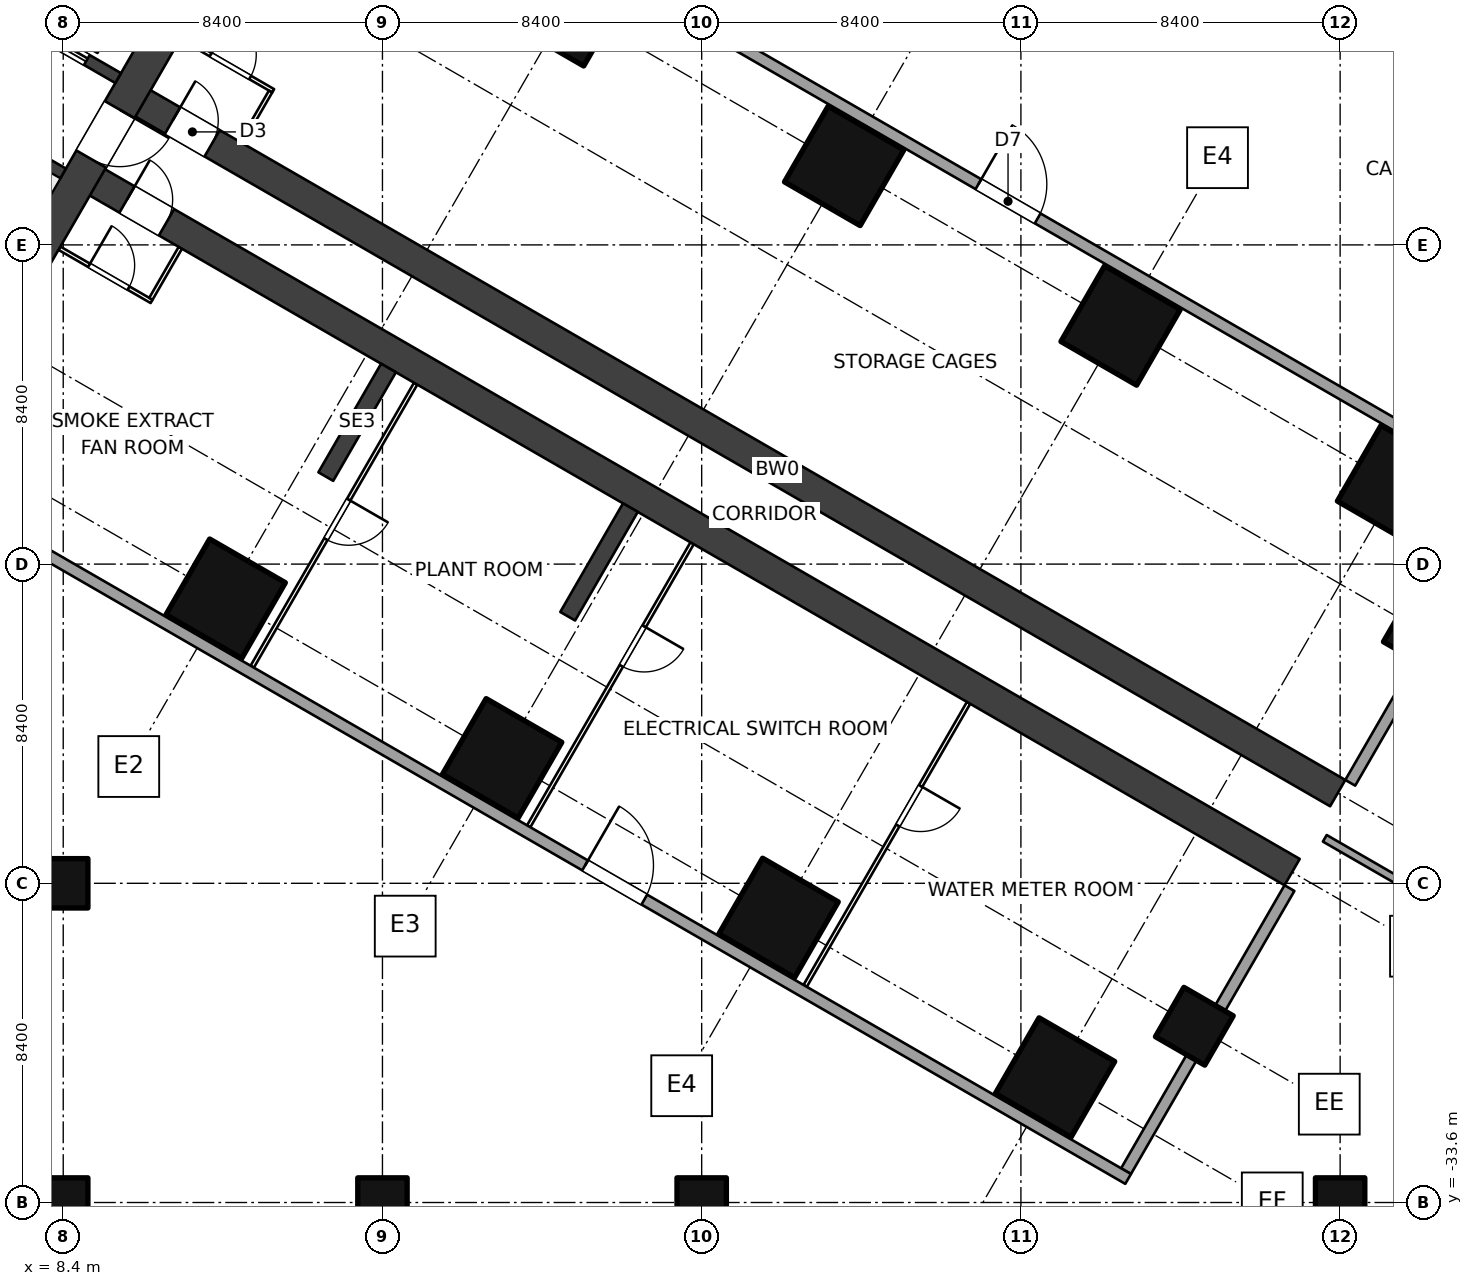
"""IFC4 building model, lengths in metres.
Left out: names, types, materials, properties, quantities, classifications, styles, units other than length and angle.
Written with IfcOpenShell. Run it as: python <this file> out.ifc"""

import sys

from ifc_helpers import new_model, si_unit, direction, frame, frame_2d, origin, origin_2d, place, context, subcontext, project, spatial, rectangle, extrude, element, fill, save


model = new_model("IFC4")
c1 = context("Model", 3, precision=1e-05, world=origin(), true_north=direction((0.0, 1.0)))
c2 = subcontext(c1, "Body", "Model", "MODEL_VIEW")
j1 = project(units=[si_unit("LENGTHUNIT", "METRE"), si_unit("PLANEANGLEUNIT", "RADIAN")], contexts=[c1])
p1 = place(None, origin())
s1 = spatial("IfcSite", under=j1, at=p1, CompositionType="ELEMENT")
p2 = place(p1, origin())
s2 = spatial("IfcBuilding", under=s1, at=p2, CompositionType="ELEMENT")
p3 = place(p2, frame((0.0, 0.0, -3.5)))
s3 = spatial("IfcBuildingStorey", under=s2, at=p3, CompositionType="ELEMENT", Elevation=-3.5)
for number, where, z_axis, x_axis in (
    (1, (21.675, -2.122, 0.0), (0.0, 0.0, 1.0), (-0.5, -0.866, 0.0)),
    (2, (12.675, -17.71, 0.0), (0.0, 0.0, 1.0), (-0.5, -0.866, 0.0)),
    (3, (28.949, -6.322, 0.0), (0.0, 0.0, 1.0), (-0.5, -0.866, 0.0)),
    (4, (19.949, -21.91, 0.0), (0.0, 0.0, 1.0), (-0.5, -0.866, 0.0)),
    (5, (36.224, -10.521, 0.0), (0.0, 0.0, 1.0), (-0.5, -0.866, 0.0)),
    (6, (27.224, -26.11, 0.0), (0.0, 0.0, 1.0), (-0.5, -0.866, 0.0)),
    (7, (43.499, -14.721, 0.0), (0.0, 0.0, 1.0), (-0.5, -0.866, 0.0)),
    (8, (34.499, -30.31, 0.0), (0.0, 0.0, 1.0), (-0.5, -0.866, 0.0)),
):
    element("IfcColumn", number, at=place(p3, frame(where, z_axis=z_axis, x_axis=x_axis)), inside=s3, PredefinedType="COLUMN", context=c2, shape_type="SweptSolid", body=[
        extrude(rectangle(XDim=2.3, YDim=2.3, at=origin_2d()), origin(), (0.0, 0.0, 1.0), 3.5),
    ])
for number, where, z_axis, x_axis in (
    (9, (44.164, -18.57, 0.0), (0.0, 0.0, 1.0), (-0.5, -0.866, 0.0)),
    (10, (38.164, -28.962, 0.0), (0.0, 0.0, 1.0), (-0.5, -0.866, 0.0)),
):
    element("IfcColumn", number, at=place(p3, frame(where, z_axis=z_axis, x_axis=x_axis)), inside=s3, PredefinedType="COLUMN", context=c2, shape_type="SweptSolid", body=[
        extrude(rectangle(XDim=1.5, YDim=1.5, at=origin_2d()), origin(), (0.0, 0.0, 1.0), 3.5),
    ])
for number, where, z_axis, x_axis in (
    (11, (8.4, -33.6, 0.0), (0.0, 0.0, 1.0), (1.0, 0.0, 0.0)),
    (12, (8.4, -25.2, 0.0), (0.0, 0.0, 1.0), (1.0, 0.0, 0.0)),
    (13, (16.8, -33.6, 0.0), (0.0, 0.0, 1.0), (1.0, 0.0, 0.0)),
    (14, (25.2, -33.6, 0.0), (0.0, 0.0, 1.0), (1.0, 0.0, 0.0)),
    (15, (42.0, -33.6, 0.0), (0.0, 0.0, 1.0), (1.0, 0.0, 0.0)),
):
    element("IfcColumn", number, at=place(p3, frame(where, z_axis=z_axis, x_axis=x_axis)), inside=s3, PredefinedType="COLUMN", context=c2, shape_type="SweptSolid", body=[
        extrude(rectangle(XDim=1.3, YDim=1.3, at=origin_2d()), origin(), (0.0, 0.0, 1.0), 3.5),
    ])
p4 = place(p3, frame((12.551, -0.225, 0.0), z_axis=(0.0, 0.0, 1.0), x_axis=(-0.499997612506, -0.8660267822, 0.0)))
e16 = element("IfcWall", 16, at=p4, inside=s3, PredefinedType="SHEAR", context=c2, shape_type="SweptSolid", body=[
    extrude(rectangle(XDim=12.161, YDim=0.9, at=frame_2d((6.08, 0.0))), origin(), (0.0, 0.0, 1.0), 3.5),
])
p5 = place(p4, frame((5.33, 0.0, 0.0)))
e17 = element("IfcOpeningElement", 17, at=p5, cuts=e16, PredefinedType="OPENING", context=c2, shape_type="SweptSolid", body=[
    extrude(rectangle(XDim=1.5, YDim=2.1, at=frame_2d((0.75, 1.05))), frame((0.0, 0.46, 0.0), z_axis=(0.0, -1.0, 0.0), x_axis=(1.0, 0.0, 0.0)), (0.0, 0.0, 1.0), 0.92),
])
p6 = place(p3, frame((2.419, -3.071, 0.0), z_axis=(0.0, 0.0, 1.0), x_axis=(0.86602711848, -0.499997030048, 0.0)))
e18 = element("IfcWall", 18, at=p6, inside=s3, PredefinedType="SHEAR", context=c2, shape_type="SweptSolid", body=[
    extrude(rectangle(XDim=6.901, YDim=0.3, at=frame_2d((3.451, 0.0))), origin(), (0.0, 0.0, 1.0), 3.5),
])
p7 = place(p6, frame((0.25, 0.0, 0.0)))
e19 = element("IfcOpeningElement", 19, at=p7, cuts=e18, PredefinedType="OPENING", context=c2, shape_type="SweptSolid", body=[
    extrude(rectangle(XDim=1.0, YDim=2.1, at=frame_2d((0.5, 1.05))), frame((0.0, 0.16, 0.0), z_axis=(0.0, -1.0, 0.0), x_axis=(1.0, 0.0, 0.0)), (0.0, 0.0, 1.0), 0.32),
])
p8 = place(p3, frame((3.869, -0.559, 0.0), z_axis=(0.0, 0.0, 1.0), x_axis=(0.86602711848, -0.499997030048, 0.0)))
e20 = element("IfcWall", 20, at=p8, inside=s3, PredefinedType="SHEAR", context=c2, shape_type="SweptSolid", body=[
    extrude(rectangle(XDim=6.901, YDim=0.3, at=frame_2d((3.451, 0.0))), origin(), (0.0, 0.0, 1.0), 3.5),
])
p9 = place(p8, frame((4.85, 0.0, 0.0)))
e21 = element("IfcOpeningElement", 21, at=p9, cuts=e20, PredefinedType="OPENING", context=c2, shape_type="SweptSolid", body=[
    extrude(rectangle(XDim=1.1, YDim=2.1, at=frame_2d((0.55, 1.05))), frame((0.0, 0.16, 0.0), z_axis=(0.0, -1.0, 0.0), x_axis=(1.0, 0.0, 0.0)), (0.0, 0.0, 1.0), 0.32),
])
p10 = place(p3, frame((10.11, -4.451, 0.0), z_axis=(0.0, 0.0, 1.0), x_axis=(0.866025284237, -0.500000207062, 0.0)))
e22 = element("IfcWall", 22, at=p10, inside=s3, PredefinedType="SHEAR", context=c2, shape_type="SweptSolid", body=[
    extrude(rectangle(XDim=36.75, YDim=0.8, at=frame_2d((18.375, 0.0))), origin(), (0.0, 0.0, 1.0), 3.5),
])
p11 = place(p10, frame((1.35, 0.0, 0.0)))
e23 = element("IfcOpeningElement", 23, at=p11, cuts=e22, PredefinedType="OPENING", context=c2, shape_type="SweptSolid", body=[
    extrude(rectangle(XDim=1.2, YDim=2.1, at=frame_2d((0.6, 1.05))), frame((0.0, 0.41, 0.0), z_axis=(0.0, -1.0, 0.0), x_axis=(1.0, 0.0, 0.0)), (0.0, 0.0, 1.0), 0.82),
])
p12 = place(p3, frame((8.91, -6.53, 0.0), z_axis=(0.0, 0.0, 1.0), x_axis=(0.866025284237, -0.500000207062, 0.0)))
e24 = element("IfcWall", 24, at=p12, inside=s3, PredefinedType="SHEAR", context=c2, shape_type="SweptSolid", body=[
    extrude(rectangle(XDim=36.75, YDim=0.8, at=frame_2d((18.375, 0.0))), origin(), (0.0, 0.0, 1.0), 3.5),
])
p13 = place(p12, frame((1.35, 0.0, 0.0)))
e25 = element("IfcOpeningElement", 25, at=p13, cuts=e24, PredefinedType="OPENING", context=c2, shape_type="SweptSolid", body=[
    extrude(rectangle(XDim=1.2, YDim=2.1, at=frame_2d((0.6, 1.05))), frame((0.0, 0.41, 0.0), z_axis=(0.0, -1.0, 0.0), x_axis=(1.0, 0.0, 0.0)), (0.0, 0.0, 1.0), 0.82),
])
p14 = place(p3, frame((11.5, -2.945, 0.0), z_axis=(0.0, 0.0, 1.0), x_axis=(0.866034573852, -0.49998411664, 0.0)))
e26 = element("IfcWall", 26, at=p14, inside=s3, PredefinedType="PARTITIONING", context=c2, shape_type="SweptSolid", body=[
    extrude(rectangle(XDim=2.8, YDim=0.1, at=frame_2d((1.4, 0.0))), origin(), (0.0, 0.0, 1.0), 3.15),
])
p15 = place(p14, frame((0.9, 0.0, 0.0)))
e27 = element("IfcOpeningElement", 27, at=p15, cuts=e26, PredefinedType="OPENING", context=c2, shape_type="SweptSolid", body=[
    extrude(rectangle(XDim=1.2, YDim=2.1, at=frame_2d((0.6, 1.05))), frame((0.0, 0.06, 0.0), z_axis=(0.0, -1.0, 0.0), x_axis=(1.0, 0.0, 0.0)), (0.0, 0.0, 1.0), 0.12),
])
p16 = place(p3, frame((13.082, -5.705, 0.0), z_axis=(0.0, 0.0, 1.0), x_axis=(0.500086022567, 0.865975732936, 0.0)))
e28 = element("IfcWall", 28, at=p16, inside=s3, PredefinedType="PARTITIONING", context=c2, shape_type="SweptSolid", body=[
    extrude(rectangle(XDim=1.55, YDim=0.1, at=frame_2d((0.775, 0.0))), origin(), (0.0, 0.0, 1.0), 3.15),
])
p17 = place(p3, frame((8.3, -8.487, 0.0), z_axis=(0.0, 0.0, 1.0), x_axis=(0.866034573852, -0.49998411664, 0.0)))
e29 = element("IfcWall", 29, at=p17, inside=s3, PredefinedType="PARTITIONING", context=c2, shape_type="SweptSolid", body=[
    extrude(rectangle(XDim=2.8, YDim=0.1, at=frame_2d((1.4, 0.0))), origin(), (0.0, 0.0, 1.0), 3.15),
])
p18 = place(p17, frame((0.9, 0.0, 0.0)))
e30 = element("IfcOpeningElement", 30, at=p18, cuts=e29, PredefinedType="OPENING", context=c2, shape_type="SweptSolid", body=[
    extrude(rectangle(XDim=1.2, YDim=2.1, at=frame_2d((0.6, 1.05))), frame((0.0, 0.06, 0.0), z_axis=(0.0, -1.0, 0.0), x_axis=(1.0, 0.0, 0.0)), (0.0, 0.0, 1.0), 0.12),
])
p19 = place(p3, frame((11.482, -8.476, 0.0), z_axis=(0.0, 0.0, 1.0), x_axis=(-0.500017819788, -0.86601511528, 0.0)))
e31 = element("IfcWall", 31, at=p19, inside=s3, PredefinedType="PARTITIONING", context=c2, shape_type="SweptSolid", body=[
    extrude(rectangle(XDim=1.55, YDim=0.1, at=frame_2d((0.775, 0.0))), origin(), (0.0, 0.0, 1.0), 3.15),
])
p20 = place(p3, frame((17.674, -12.052, 0.0), z_axis=(0.0, 0.0, 1.0), x_axis=(-0.500007509209, -0.866021068297, 0.0)))
e32 = element("IfcWall", 32, at=p20, inside=s3, PredefinedType="PARTITIONING", context=c2, shape_type="SweptSolid", body=[
    extrude(rectangle(XDim=8.6, YDim=0.1, at=frame_2d((4.3, 0.0))), origin(), (0.0, 0.0, 1.0), 3.15),
])
p21 = place(p20, frame((3.525, 0.0, 0.0)))
e33 = element("IfcOpeningElement", 33, at=p21, cuts=e32, PredefinedType="OPENING", context=c2, shape_type="SweptSolid", body=[
    extrude(rectangle(XDim=1.2, YDim=2.1, at=frame_2d((0.6, 1.05))), frame((0.0, 0.06, 0.0), z_axis=(0.0, -1.0, 0.0), x_axis=(1.0, 0.0, 0.0)), (0.0, 0.0, 1.0), 0.12),
])
p22 = place(p3, frame((24.948, -16.251, 0.0), z_axis=(0.0, 0.0, 1.0), x_axis=(-0.500007509209, -0.866021068297, 0.0)))
e34 = element("IfcWall", 34, at=p22, inside=s3, PredefinedType="PARTITIONING", context=c2, shape_type="SweptSolid", body=[
    extrude(rectangle(XDim=8.6, YDim=0.1, at=frame_2d((4.3, 0.0))), origin(), (0.0, 0.0, 1.0), 3.15),
])
p23 = place(p22, frame((2.525, 0.0, 0.0)))
e35 = element("IfcOpeningElement", 35, at=p23, cuts=e34, PredefinedType="OPENING", context=c2, shape_type="SweptSolid", body=[
    extrude(rectangle(XDim=1.2, YDim=2.1, at=frame_2d((0.6, 1.05))), frame((0.0, 0.06, 0.0), z_axis=(0.0, -1.0, 0.0), x_axis=(1.0, 0.0, 0.0)), (0.0, 0.0, 1.0), 0.12),
])
p24 = place(p3, frame((32.223, -20.451, 0.0), z_axis=(0.0, 0.0, 1.0), x_axis=(-0.500007509209, -0.866021068297, 0.0)))
e36 = element("IfcWall", 36, at=p24, inside=s3, PredefinedType="PARTITIONING", context=c2, shape_type="SweptSolid", body=[
    extrude(rectangle(XDim=8.6, YDim=0.1, at=frame_2d((4.3, 0.0))), origin(), (0.0, 0.0, 1.0), 3.15),
])
p25 = place(p24, frame((2.525, 0.0, 0.0)))
e37 = element("IfcOpeningElement", 37, at=p25, cuts=e36, PredefinedType="OPENING", context=c2, shape_type="SweptSolid", body=[
    extrude(rectangle(XDim=1.2, YDim=2.1, at=frame_2d((0.6, 1.05))), frame((0.0, 0.06, 0.0), z_axis=(0.0, -1.0, 0.0), x_axis=(1.0, 0.0, 0.0)), (0.0, 0.0, 1.0), 0.12),
])
p26 = place(p3, frame((41.596, -24.016, 0.0), z_axis=(0.0, 0.0, 1.0), x_axis=(0.866034858292, -0.499983623955, 0.0)))
e38 = element("IfcWall", 38, at=p26, inside=s3, PredefinedType="SOLIDWALL", context=c2, shape_type="SweptSolid", body=[
    extrude(rectangle(XDim=10.627, YDim=0.2, at=frame_2d((5.313, 0.0))), origin(), (0.0, 0.0, 1.0), 3.15),
])
for number, where, z_axis, x_axis in (
    (39, (42.267, -22.555, 0.0), (0.0, 0.0, 1.0), (0.5, 0.866, 0.0)),
    (40, (40.667, -25.326, 0.0), (0.0, 0.0, 1.0), (-0.5, -0.866, 0.0)),
):
    element("IfcWall", number, at=place(p3, frame(where, z_axis=z_axis, x_axis=x_axis)), inside=s3, PredefinedType="SOLIDWALL", context=c2, shape_type="SweptSolid", body=[
        extrude(rectangle(XDim=8.6, YDim=0.3, at=frame_2d((4.3, 0.0))), origin(), (0.0, 0.0, 1.0), 1.55),
    ])
p27 = place(p3, frame((9.45, 6.495, 0.0), z_axis=(0.0, 0.0, 1.0), x_axis=(0.866025301493, -0.500000177174, 0.0)))
e41 = element("IfcWall", 41, at=p27, inside=s3, PredefinedType="SOLIDWALL", context=c2, shape_type="SweptSolid", body=[
    extrude(rectangle(XDim=43.095, YDim=0.3, at=frame_2d((21.548, 0.0))), origin(), (0.0, 0.0, 1.0), 3.15),
])
p28 = place(p27, frame((26.595, 0.0, 0.0)))
e42 = element("IfcOpeningElement", 42, at=p28, cuts=e41, PredefinedType="OPENING", context=c2, shape_type="SweptSolid", body=[
    extrude(rectangle(XDim=1.8, YDim=2.4, at=frame_2d((0.9, 1.2))), frame((0.0, 0.16, 0.0), z_axis=(0.0, -1.0, 0.0), x_axis=(1.0, 0.0, 0.0)), (0.0, 0.0, 1.0), 0.32),
])
p29 = place(p3, frame((-0.9, -11.432, 0.0), z_axis=(0.0, 0.0, 1.0), x_axis=(0.866025301493, -0.500000177174, 0.0)))
e43 = element("IfcWall", 43, at=p29, inside=s3, PredefinedType="SOLIDWALL", context=c2, shape_type="SweptSolid", body=[
    extrude(rectangle(XDim=43.095, YDim=0.3, at=frame_2d((21.548, 0.0))), origin(), (0.0, 0.0, 1.0), 3.15),
])
p30 = place(p29, frame((26.595, 0.0, 0.0)))
e44 = element("IfcOpeningElement", 44, at=p30, cuts=e43, PredefinedType="OPENING", context=c2, shape_type="SweptSolid", body=[
    extrude(rectangle(XDim=1.8, YDim=2.4, at=frame_2d((0.9, 1.2))), frame((0.0, 0.16, 0.0), z_axis=(0.0, -1.0, 0.0), x_axis=(1.0, 0.0, 0.0)), (0.0, 0.0, 1.0), 0.32),
])
for number, where, z_axis, x_axis in (
    (45, (16.959, -11.639, 0.0), (0.0, 0.0, 1.0), (-0.5, -0.866, 0.0)),
    (46, (23.324, -15.314, 0.0), (0.0, 0.0, 1.0), (-0.5, -0.866, 0.0)),
):
    element("IfcWall", number, at=place(p3, frame(where, z_axis=z_axis, x_axis=x_axis)), inside=s3, PredefinedType="SOLIDWALL", context=c2, shape_type="SweptSolid", body=[
        extrude(rectangle(XDim=3.3, YDim=0.45, at=frame_2d((1.65, 0.0))), origin(), (0.0, 0.0, 1.0), 3.5),
    ])
p31 = place(p9, origin())
e47 = element("IfcDoor", 47, at=p31, inside=s3, OperationType="DOUBLE_DOOR_SLIDING", PredefinedType="DOOR", context=c2, shape_type="SweptSolid", body=[
    extrude(rectangle(XDim=1.1, YDim=2.1, at=frame_2d((0.55, 1.05))), frame((0.0, 0.025, 0.0), z_axis=(0.0, -1.0, 0.0), x_axis=(1.0, 0.0, 0.0)), (0.0, 0.0, 1.0), 0.05),
])
fill(e21, e47)
p32 = place(p5, origin())
e48 = element("IfcDoor", 48, at=p32, inside=s3, OperationType="DOUBLE_DOOR_DOUBLE_SWING", PredefinedType="DOOR", context=c2, shape_type="SweptSolid", body=[
    extrude(rectangle(XDim=1.5, YDim=2.1, at=frame_2d((0.75, 1.05))), frame((0.0, 0.025, 0.0), z_axis=(0.0, -1.0, 0.0), x_axis=(1.0, 0.0, 0.0)), (0.0, 0.0, 1.0), 0.05),
])
fill(e17, e48)
p33 = place(p11, origin())
e49 = element("IfcDoor", 49, at=p33, inside=s3, OperationType="DOUBLE_SWING_LEFT", PredefinedType="DOOR", context=c2, shape_type="SweptSolid", body=[
    extrude(rectangle(XDim=1.2, YDim=2.1, at=frame_2d((0.6, 1.05))), frame((0.0, 0.025, 0.0), z_axis=(0.0, -1.0, 0.0), x_axis=(1.0, 0.0, 0.0)), (0.0, 0.0, 1.0), 0.05),
])
fill(e23, e49)
p34 = place(p15, origin())
e50 = element("IfcDoor", 50, at=p34, inside=s3, OperationType="DOUBLE_SWING_LEFT", PredefinedType="DOOR", context=c2, shape_type="SweptSolid", body=[
    extrude(rectangle(XDim=1.2, YDim=2.1, at=frame_2d((0.6, 1.05))), frame((0.0, 0.025, 0.0), z_axis=(0.0, -1.0, 0.0), x_axis=(1.0, 0.0, 0.0)), (0.0, 0.0, 1.0), 0.05),
])
fill(e27, e50)
p35 = place(p13, origin())
e51 = element("IfcDoor", 51, at=p35, inside=s3, OperationType="DOUBLE_SWING_LEFT", PredefinedType="DOOR", context=c2, shape_type="SweptSolid", body=[
    extrude(rectangle(XDim=1.2, YDim=2.1, at=frame_2d((0.6, 1.05))), frame((0.0, 0.025, 0.0), z_axis=(0.0, -1.0, 0.0), x_axis=(1.0, 0.0, 0.0)), (0.0, 0.0, 1.0), 0.05),
])
fill(e25, e51)
p36 = place(p21, origin())
e52 = element("IfcDoor", 52, at=p36, inside=s3, OperationType="DOUBLE_SWING_LEFT", PredefinedType="DOOR", context=c2, shape_type="SweptSolid", body=[
    extrude(rectangle(XDim=1.2, YDim=2.1, at=frame_2d((0.6, 1.05))), frame((0.0, 0.025, 0.0), z_axis=(0.0, -1.0, 0.0), x_axis=(1.0, 0.0, 0.0)), (0.0, 0.0, 1.0), 0.05),
])
fill(e33, e52)
p37 = place(p23, origin())
e53 = element("IfcDoor", 53, at=p37, inside=s3, OperationType="DOUBLE_SWING_LEFT", PredefinedType="DOOR", context=c2, shape_type="SweptSolid", body=[
    extrude(rectangle(XDim=1.2, YDim=2.1, at=frame_2d((0.6, 1.05))), frame((0.0, 0.025, 0.0), z_axis=(0.0, -1.0, 0.0), x_axis=(1.0, 0.0, 0.0)), (0.0, 0.0, 1.0), 0.05),
])
fill(e35, e53)
p38 = place(p25, origin())
e54 = element("IfcDoor", 54, at=p38, inside=s3, OperationType="DOUBLE_SWING_LEFT", PredefinedType="DOOR", context=c2, shape_type="SweptSolid", body=[
    extrude(rectangle(XDim=1.2, YDim=2.1, at=frame_2d((0.6, 1.05))), frame((0.0, 0.025, 0.0), z_axis=(0.0, -1.0, 0.0), x_axis=(1.0, 0.0, 0.0)), (0.0, 0.0, 1.0), 0.05),
])
fill(e37, e54)
p39 = place(p18, origin())
e55 = element("IfcDoor", 55, at=p39, inside=s3, OperationType="DOUBLE_SWING_LEFT", PredefinedType="DOOR", context=c2, shape_type="SweptSolid", body=[
    extrude(rectangle(XDim=1.2, YDim=2.1, at=frame_2d((0.6, 1.05))), frame((0.0, 0.025, 0.0), z_axis=(0.0, -1.0, 0.0), x_axis=(1.0, 0.0, 0.0)), (0.0, 0.0, 1.0), 0.05),
])
fill(e30, e55)
p40 = place(p28, origin())
e56 = element("IfcDoor", 56, at=p40, inside=s3, OperationType="DOUBLE_DOOR_DOUBLE_SWING", PredefinedType="DOOR", context=c2, shape_type="SweptSolid", body=[
    extrude(rectangle(XDim=1.8, YDim=2.4, at=frame_2d((0.9, 1.2))), frame((0.0, 0.025, 0.0), z_axis=(0.0, -1.0, 0.0), x_axis=(1.0, 0.0, 0.0)), (0.0, 0.0, 1.0), 0.05),
])
fill(e42, e56)
p41 = place(p30, origin())
e57 = element("IfcDoor", 57, at=p41, inside=s3, OperationType="DOUBLE_DOOR_DOUBLE_SWING", PredefinedType="DOOR", context=c2, shape_type="SweptSolid", body=[
    extrude(rectangle(XDim=1.8, YDim=2.4, at=frame_2d((0.9, 1.2))), frame((0.0, 0.025, 0.0), z_axis=(0.0, -1.0, 0.0), x_axis=(1.0, 0.0, 0.0)), (0.0, 0.0, 1.0), 0.05),
])
fill(e44, e57)
save(model, sys.argv[1])
